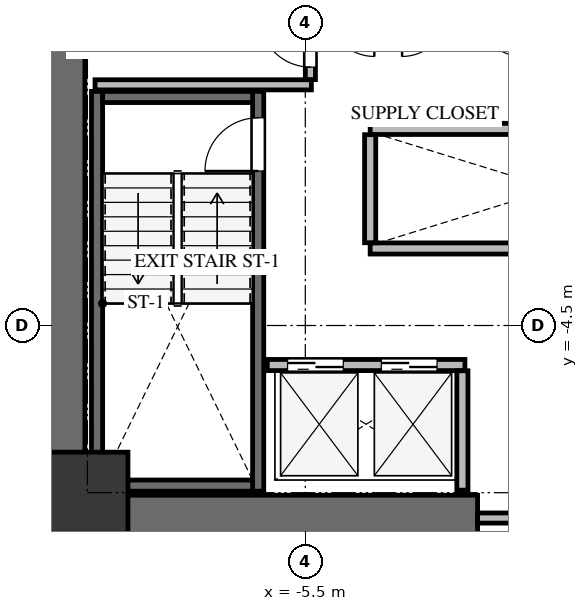
"""IFC4 building model, lengths in metres.
Left out: names, types, materials, properties, quantities, classifications, styles, units other than length and angle.
Written with IfcOpenShell. Run it as: python <this file> out.ifc"""

import sys

from ifc_helpers import new_model, si_unit, direction, frame, frame_2d, origin, origin_2d, place, context, subcontext, project, spatial, rectangle, extrude, source, transform, mapped, element, fill, save


model = new_model("IFC4")
c1 = context("Model", 3, precision=1e-05, world=origin(), true_north=direction((0.0, 1.0)))
c2 = subcontext(c1, "Body", "Model", "MODEL_VIEW")
j1 = project(units=[si_unit("LENGTHUNIT", "METRE"), si_unit("PLANEANGLEUNIT", "RADIAN")], contexts=[c1])
p1 = place(None, origin())
s1 = spatial("IfcSite", under=j1, at=p1, CompositionType="ELEMENT")
p2 = place(p1, origin())
s2 = spatial("IfcBuilding", under=s1, at=p2, CompositionType="ELEMENT")
p3 = place(p2, frame((0.0, 0.0, 42.3)))
s3 = spatial("IfcBuildingStorey", under=s2, at=p3, CompositionType="ELEMENT", Elevation=42.3)
p4 = place(p3, frame((-10.3, -8.75, 0.0), z_axis=(0.0, 0.0, 1.0), x_axis=(0.0, 1.0, 0.0)))
e1 = element("IfcWall", 1, at=p4, inside=s3, PredefinedType="SHEAR", context=c2, shape_type="SweptSolid", body=[
    extrude(rectangle(XDim=17.5, YDim=0.9, at=frame_2d((8.75, 0.0))), origin(), (0.0, 0.0, 1.0), 3.3),
])
p5 = place(p3, frame((-9.85, -8.3, 0.0), z_axis=(0.0, 0.0, 1.0), x_axis=(1.0, 0.0, 0.0)))
e2 = element("IfcWall", 2, at=p5, inside=s3, PredefinedType="SHEAR", context=c2, shape_type="SweptSolid", body=[
    extrude(rectangle(XDim=7.75, YDim=0.9, at=frame_2d((3.875, 0.0))), origin(), (0.0, 0.0, 1.0), 3.3),
])
p6 = place(p3, frame((-6.43, -7.77, -0.24), z_axis=(0.0, 0.0, 1.0), x_axis=(0.0, 1.0, 0.0)))
e3 = element("IfcWall", 3, at=p6, inside=s3, PredefinedType="SHEAR", context=c2, shape_type="SweptSolid", body=[
    extrude(rectangle(XDim=7.89, YDim=0.22, at=frame_2d((3.945, 0.0))), origin(), (0.0, 0.0, 1.0), 3.3),
])
p7 = place(p6, frame((6.32, 0.0, 0.0)))
e4 = element("IfcOpeningElement", 4, at=p7, cuts=e3, PredefinedType="OPENING", context=c2, shape_type="SweptSolid", body=[
    extrude(rectangle(XDim=1.05, YDim=2.15, at=frame_2d((0.525, 1.075))), frame((0.0, 0.12, 0.0), z_axis=(0.0, -1.0, 0.0), x_axis=(1.0, 0.0, 0.0)), (0.0, 0.0, 1.0), 0.24),
])
p8 = place(p3, frame((-9.61, 0.12, -0.24), z_axis=(0.0, 0.0, 1.0), x_axis=(0.0, -1.0, 0.0)))
e5 = element("IfcWall", 5, at=p8, inside=s3, PredefinedType="SHEAR", context=c2, shape_type="SweptSolid", body=[
    extrude(rectangle(XDim=7.89, YDim=0.22, at=frame_2d((3.945, 0.0))), origin(), (0.0, 0.0, 1.0), 3.3),
])
for number, where, z_axis, x_axis in (
    (6, (-9.5, -7.66, -0.24), (0.0, 0.0, 1.0), (1.0, 0.0, 0.0)),
    (7, (-6.54, 0.01, -0.24), (0.0, 0.0, 1.0), (-1.0, 0.0, 0.0)),
):
    element("IfcWall", number, at=place(p3, frame(where, z_axis=z_axis, x_axis=x_axis)), inside=s3, PredefinedType="SHEAR", context=c2, shape_type="SweptSolid", body=[
        extrude(rectangle(XDim=2.96, YDim=0.22, at=frame_2d((1.48, 0.0))), origin(), (0.0, 0.0, 1.0), 3.3),
    ])
m1 = source(origin(), c2, "Body", "SweptSolid", [
    extrude(rectangle(XDim=1.6, YDim=1.6, at=origin_2d()), origin(), (0.0, 0.0, 1.0), 3.3),
])
p9 = place(p3, frame((-9.8, -7.8, -0.24), z_axis=(0.0, 0.0, 1.0), x_axis=(1.0, 0.0, 0.0)))
e8 = element("IfcColumn", 8, at=p9, inside=s3, PredefinedType="COLUMN", context=c2, shape_type="MappedRepresentation", body=[
    mapped(m1, transform((0.0, 0.0, 0.0), x_axis=(1.0, 0.0, 0.0), y_axis=(0.0, 1.0, 0.0), z_axis=(0.0, 0.0, 1.0), scale=1.0)),
])
p10 = place(p3, frame((-2.1, -8.3, 0.0), z_axis=(0.0, 0.0, 1.0), x_axis=(1.0, 0.0, 0.0)))
e9 = element("IfcWall", 9, at=p10, inside=s3, PredefinedType="SOLIDWALL", context=c2, shape_type="SweptSolid", body=[
    extrude(rectangle(XDim=4.2, YDim=0.2, at=frame_2d((2.1, 0.0))), origin(), (0.0, 0.0, 1.0), 3.045),
])
p11 = place(p10, frame((1.2, 0.0, 0.0)))
e10 = element("IfcOpeningElement", 10, at=p11, cuts=e9, PredefinedType="OPENING", context=c2, shape_type="SweptSolid", body=[
    extrude(rectangle(XDim=1.8, YDim=2.15, at=frame_2d((0.9, 1.075))), frame((0.0, 0.11, 0.0), z_axis=(0.0, -1.0, 0.0), x_axis=(1.0, 0.0, 0.0)), (0.0, 0.0, 1.0), 0.22),
])
p12 = place(p3, frame((-9.65, 0.25, 0.0), z_axis=(0.0, 0.0, 1.0), x_axis=(1.0, 0.0, 0.0)))
e11 = element("IfcWall", 11, at=p12, inside=s3, PredefinedType="SOLIDWALL", context=c2, shape_type="SweptSolid", body=[
    extrude(rectangle(XDim=4.27, YDim=0.2, at=frame_2d((2.135, 0.0))), origin(), (0.0, 0.0, 1.0), 3.045),
])
p13 = place(p3, frame((-5.4, 0.354, 0.0), z_axis=(0.0, 0.0, 1.0), x_axis=(0.0, 1.0, 0.0)))
e12 = element("IfcWall", 12, at=p13, inside=s3, PredefinedType="SOLIDWALL", context=c2, shape_type="SweptSolid", body=[
    extrude(rectangle(XDim=4.026, YDim=0.2, at=frame_2d((2.013, 0.0))), origin(), (0.0, 0.0, 1.0), 3.045),
])
p14 = place(p13, frame((0.246, 0.0, 0.0)))
e13 = element("IfcOpeningElement", 13, at=p14, cuts=e12, PredefinedType="OPENING", context=c2, shape_type="SweptSolid", body=[
    extrude(rectangle(XDim=1.0, YDim=2.15, at=frame_2d((0.5, 1.075))), frame((0.0, 0.11, 0.0), z_axis=(0.0, -1.0, 0.0), x_axis=(1.0, 0.0, 0.0)), (0.0, 0.0, 1.0), 0.22),
])
p15 = place(p3, frame((-6.25, -5.28, 0.0), z_axis=(0.0, 0.0, 1.0), x_axis=(1.0, 0.0, 0.0)))
e14 = element("IfcWall", 14, at=p15, inside=s3, PredefinedType="SOLIDWALL", context=c2, shape_type="SweptSolid", body=[
    extrude(rectangle(XDim=3.9, YDim=0.22, at=frame_2d((1.95, 0.0))), origin(), (0.0, 0.0, 1.0), 3.045),
])
p16 = place(p15, frame((0.4, 0.0, 0.0)))
e15 = element("IfcOpeningElement", 15, at=p16, cuts=e14, PredefinedType="OPENING", context=c2, shape_type="SweptSolid", body=[
    extrude(rectangle(XDim=1.1, YDim=2.15, at=frame_2d((0.55, 1.075))), frame((0.0, 0.12, 0.0), z_axis=(0.0, -1.0, 0.0), x_axis=(1.0, 0.0, 0.0)), (0.0, 0.0, 1.0), 0.24),
])
p17 = place(p15, frame((2.25, 0.0, 0.0)))
e16 = element("IfcOpeningElement", 16, at=p17, cuts=e14, PredefinedType="OPENING", context=c2, shape_type="SweptSolid", body=[
    extrude(rectangle(XDim=1.1, YDim=2.15, at=frame_2d((0.55, 1.075))), frame((0.0, 0.12, 0.0), z_axis=(0.0, -1.0, 0.0), x_axis=(1.0, 0.0, 0.0)), (0.0, 0.0, 1.0), 0.24),
])
p18 = place(p3, frame((-2.4, -7.75, 0.0), z_axis=(0.0, 0.0, 1.0), x_axis=(0.0, 1.0, 0.0)))
e17 = element("IfcWall", 17, at=p18, inside=s3, PredefinedType="SOLIDWALL", context=c2, shape_type="SweptSolid", body=[
    extrude(rectangle(XDim=2.356, YDim=0.22, at=frame_2d((1.178, 0.0))), origin(), (0.0, 0.0, 1.0), 3.045),
])
for number, where, z_axis, x_axis in (
    (18, (-4.22, -2.98, 0.0), (0.0, 0.0, 1.0), (1.0, 0.0, 0.0)),
    (19, (-4.22, -0.62, 0.0), (0.0, 0.0, 1.0), (1.0, 0.0, 0.0)),
):
    element("IfcWall", number, at=place(p3, frame(where, z_axis=z_axis, x_axis=x_axis)), inside=s3, PredefinedType="SOLIDWALL", context=c2, shape_type="SweptSolid", body=[
        extrude(rectangle(XDim=7.24, YDim=0.22, at=frame_2d((3.62, 0.0))), origin(), (0.0, 0.0, 1.0), 3.045),
    ])
p19 = place(p3, frame((-4.22, -2.866, 0.0), z_axis=(0.0, 0.0, 1.0), x_axis=(0.0, 1.0, 0.0)))
e20 = element("IfcWall", 20, at=p19, inside=s3, PredefinedType="SOLIDWALL", context=c2, shape_type="SweptSolid", body=[
    extrude(rectangle(XDim=2.132, YDim=0.22, at=frame_2d((1.066, 0.0))), origin(), (0.0, 0.0, 1.0), 3.045),
])
m2 = source(origin(), c2, "Body", "SweptSolid", [
    extrude(rectangle(XDim=1.05, YDim=2.15, at=frame_2d((0.525, 1.075))), frame((0.0, 0.025, 0.0), z_axis=(0.0, -1.0, 0.0), x_axis=(1.0, 0.0, 0.0)), (0.0, 0.0, 1.0), 0.05),
])
p20 = place(p7, origin())
e21 = element("IfcDoor", 21, at=p20, inside=s3, OperationType="SINGLE_SWING_LEFT", PredefinedType="DOOR", context=c2, shape_type="MappedRepresentation", body=[
    mapped(m2, transform((0.0, 0.0, 0.0), x_axis=(1.0, 0.0, 0.0), y_axis=(0.0, 1.0, 0.0), z_axis=(0.0, 0.0, 1.0), scale=1.0)),
])
fill(e4, e21)
m3 = source(origin(), c2, "Body", "SweptSolid", [
    extrude(rectangle(XDim=1.0, YDim=2.15, at=frame_2d((0.5, 1.075))), frame((0.0, 0.025, 0.0), z_axis=(0.0, -1.0, 0.0), x_axis=(1.0, 0.0, 0.0)), (0.0, 0.0, 1.0), 0.05),
])
p21 = place(p14, origin())
e22 = element("IfcDoor", 22, at=p21, inside=s3, OperationType="SINGLE_SWING_RIGHT", PredefinedType="DOOR", context=c2, shape_type="MappedRepresentation", body=[
    mapped(m3, transform((0.0, 0.0, 0.0), x_axis=(1.0, 0.0, 0.0), y_axis=(0.0, 1.0, 0.0), z_axis=(0.0, 0.0, 1.0), scale=1.0)),
])
fill(e13, e22)
m4 = source(origin(), c2, "Body", "SweptSolid", [
    extrude(rectangle(XDim=1.1, YDim=2.15, at=frame_2d((0.55, 1.075))), frame((0.0, 0.025, 0.0), z_axis=(0.0, -1.0, 0.0), x_axis=(1.0, 0.0, 0.0)), (0.0, 0.0, 1.0), 0.05),
])
p22 = place(p16, origin())
e23 = element("IfcDoor", 23, at=p22, inside=s3, OperationType="DOUBLE_DOOR_SLIDING", PredefinedType="DOOR", context=c2, shape_type="MappedRepresentation", body=[
    mapped(m4, transform((0.0, 0.0, 0.0), x_axis=(1.0, 0.0, 0.0), y_axis=(0.0, 1.0, 0.0), z_axis=(0.0, 0.0, 1.0), scale=1.0)),
])
fill(e15, e23)
p23 = place(p17, origin())
e24 = element("IfcDoor", 24, at=p23, inside=s3, OperationType="DOUBLE_DOOR_SLIDING", PredefinedType="DOOR", context=c2, shape_type="MappedRepresentation", body=[
    mapped(m4, transform((0.0, 0.0, 0.0), x_axis=(1.0, 0.0, 0.0), y_axis=(0.0, 1.0, 0.0), z_axis=(0.0, 0.0, 1.0), scale=1.0)),
])
fill(e16, e24)
save(model, sys.argv[1])
